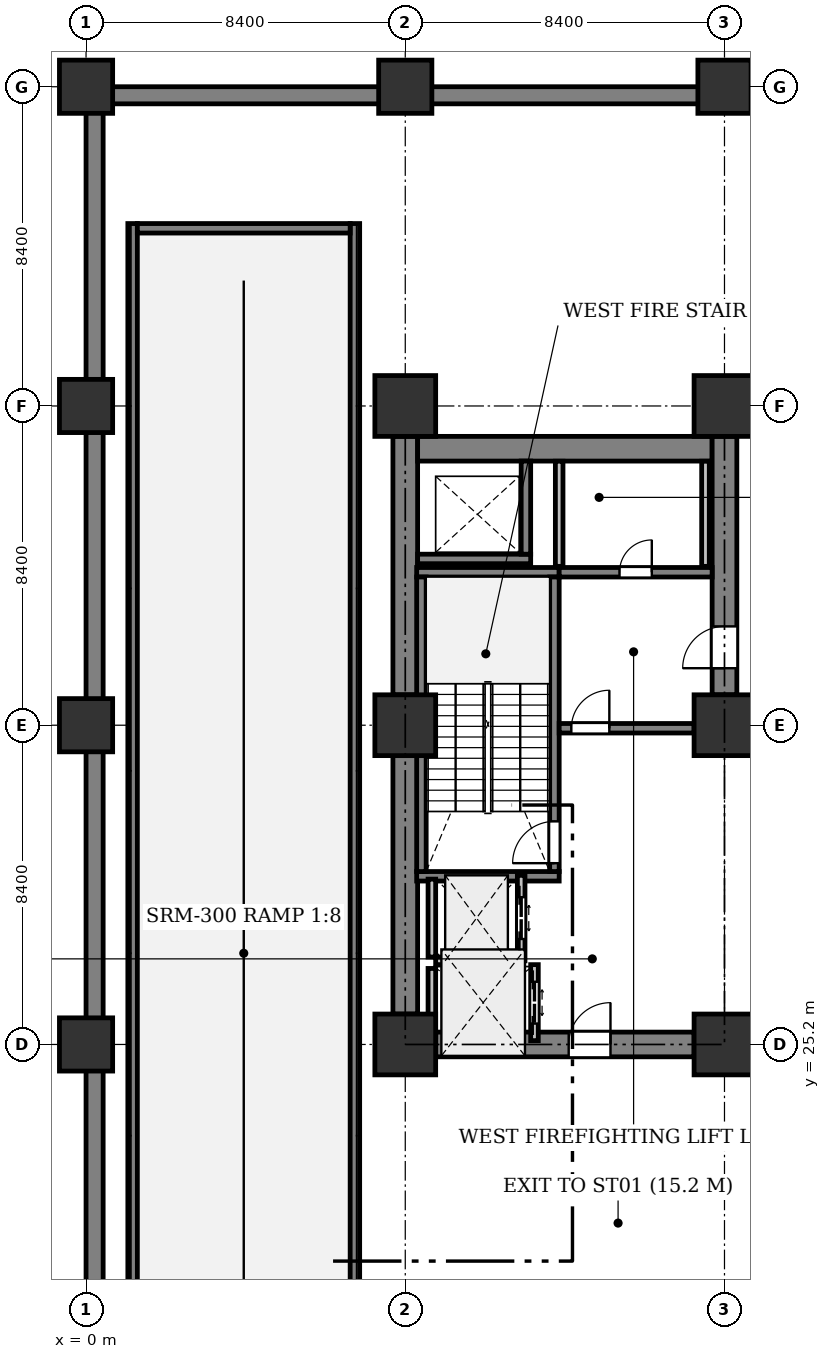
"""IFC4 building model, lengths in metres.
Left out: names, types, materials, properties, quantities, classifications, styles, units other than length and angle.
Written with IfcOpenShell. Run it as: python <this file> out.ifc"""

import sys

from ifc_helpers import new_model, si_unit, direction, frame, frame_2d, origin, origin_2d, place, context, subcontext, project, spatial, rectangle, extrude, element, fill, save


model = new_model("IFC4")
c1 = context("Model", 3, precision=1e-05, world=origin(), true_north=direction((0.0, 1.0)))
c2 = subcontext(c1, "Body", "Model", "MODEL_VIEW")
j1 = project(units=[si_unit("LENGTHUNIT", "METRE"), si_unit("PLANEANGLEUNIT", "RADIAN")], contexts=[c1])
p1 = place(None, origin())
s1 = spatial("IfcSite", under=j1, at=p1, CompositionType="ELEMENT")
p2 = place(p1, origin())
s2 = spatial("IfcBuilding", under=s1, at=p2, CompositionType="ELEMENT")
p3 = place(p2, frame((0.0, 0.0, -9.6)))
s3 = spatial("IfcBuildingStorey", under=s2, at=p3, CompositionType="ELEMENT", Elevation=-9.6)
p4 = place(p3, frame((0.0, 50.175, 0.0), z_axis=(0.0, 0.0, 1.0), x_axis=(1.0, 0.0, 0.0)))
e1 = element("IfcWall", 1, at=p4, inside=s3, PredefinedType="SOLIDWALL", context=c2, shape_type="SweptSolid", body=[
    extrude(rectangle(XDim=58.8, YDim=0.45, at=frame_2d((29.4, 0.0))), origin(), (0.0, 0.0, 1.0), 4.48),
])
p5 = place(p3, frame((0.225, 0.45, 0.0), z_axis=(0.0, 0.0, 1.0), x_axis=(0.0, 1.0, 0.0)))
e2 = element("IfcWall", 2, at=p5, inside=s3, PredefinedType="SOLIDWALL", context=c2, shape_type="SweptSolid", body=[
    extrude(rectangle(XDim=49.5, YDim=0.45, at=frame_2d((24.75, 0.0))), origin(), (0.0, 0.0, 1.0), 4.48),
])
for number, where, z_axis, x_axis in (
    (3, (1.225, 8.4, 0.0), (0.0, 0.0, 1.0), (0.0, 1.0, 0.0)),
    (4, (7.075, 8.4, 0.0), (0.0, 0.0, 1.0), (0.0, 1.0, 0.0)),
):
    element("IfcWall", number, at=place(p3, frame(where, z_axis=z_axis, x_axis=x_axis)), inside=s3, PredefinedType="SHEAR", context=c2, shape_type="SweptSolid", body=[
        extrude(rectangle(XDim=38.4, YDim=0.25, at=frame_2d((19.2, 0.0))), origin(), (0.0, 0.0, 1.0), 4.48),
    ])
p6 = place(p3, frame((1.35, 46.675, 0.0), z_axis=(0.0, 0.0, 1.0), x_axis=(1.0, 0.0, 0.0)))
e5 = element("IfcWall", 5, at=p6, inside=s3, PredefinedType="SHEAR", context=c2, shape_type="SweptSolid", body=[
    extrude(rectangle(XDim=5.6, YDim=0.25, at=frame_2d((2.8, 0.0))), origin(), (0.0, 0.0, 1.0), 4.48),
])
for number, where, z_axis, x_axis in (
    (6, (0.0, 25.2, 0.0), (0.0, 0.0, 1.0), (1.0, 0.0, 0.0)),
    (7, (0.0, 33.6, 0.0), (0.0, 0.0, 1.0), (1.0, 0.0, 0.0)),
    (8, (0.0, 42.0, 0.0), (0.0, 0.0, 1.0), (1.0, 0.0, 0.0)),
    (9, (0.0, 50.4, 0.0), (0.0, 0.0, 1.0), (1.0, 0.0, 0.0)),
):
    element("IfcColumn", number, at=place(p3, frame(where, z_axis=z_axis, x_axis=x_axis)), inside=s3, PredefinedType="COLUMN", context=c2, shape_type="SweptSolid", body=[
        extrude(rectangle(XDim=1.4, YDim=1.4, at=origin_2d()), origin(), (0.0, 0.0, 1.0), 4.8),
    ])
for number, where, z_axis, x_axis in (
    (10, (8.4, 25.2, 0.0), (0.0, 0.0, 1.0), (1.0, 0.0, 0.0)),
    (11, (8.4, 33.6, 0.0), (0.0, 0.0, 1.0), (1.0, 0.0, 0.0)),
    (12, (8.4, 42.0, 0.0), (0.0, 0.0, 1.0), (1.0, 0.0, 0.0)),
):
    element("IfcColumn", number, at=place(p3, frame(where, z_axis=z_axis, x_axis=x_axis)), inside=s3, PredefinedType="COLUMN", context=c2, shape_type="SweptSolid", body=[
        extrude(rectangle(XDim=1.6, YDim=1.6, at=origin_2d()), origin(), (0.0, 0.0, 1.0), 4.8),
    ])
p7 = place(p3, frame((8.4, 50.4, 0.0), z_axis=(0.0, 0.0, 1.0), x_axis=(1.0, 0.0, 0.0)))
e13 = element("IfcColumn", 13, at=p7, inside=s3, PredefinedType="COLUMN", context=c2, shape_type="SweptSolid", body=[
    extrude(rectangle(XDim=1.4, YDim=1.4, at=origin_2d()), origin(), (0.0, 0.0, 1.0), 4.8),
])
for number, where, z_axis, x_axis in (
    (14, (16.8, 25.2, 0.0), (0.0, 0.0, 1.0), (1.0, 0.0, 0.0)),
    (15, (16.8, 33.6, 0.0), (0.0, 0.0, 1.0), (1.0, 0.0, 0.0)),
    (16, (16.8, 42.0, 0.0), (0.0, 0.0, 1.0), (1.0, 0.0, 0.0)),
):
    element("IfcColumn", number, at=place(p3, frame(where, z_axis=z_axis, x_axis=x_axis)), inside=s3, PredefinedType="COLUMN", context=c2, shape_type="SweptSolid", body=[
        extrude(rectangle(XDim=1.6, YDim=1.6, at=origin_2d()), origin(), (0.0, 0.0, 1.0), 4.8),
    ])
p8 = place(p3, frame((16.8, 50.4, 0.0), z_axis=(0.0, 0.0, 1.0), x_axis=(1.0, 0.0, 0.0)))
e17 = element("IfcColumn", 17, at=p8, inside=s3, PredefinedType="COLUMN", context=c2, shape_type="SweptSolid", body=[
    extrude(rectangle(XDim=1.4, YDim=1.4, at=origin_2d()), origin(), (0.0, 0.0, 1.0), 4.8),
])
for number, where, z_axis, x_axis in (
    (18, (8.4, 26.0, 0.0), (0.0, 0.0, 1.0), (0.0, 1.0, 0.0)),
    (19, (8.4, 34.4, 0.0), (0.0, 0.0, 1.0), (0.0, 1.0, 0.0)),
):
    element("IfcWall", number, at=place(p3, frame(where, z_axis=z_axis, x_axis=x_axis)), inside=s3, PredefinedType="SHEAR", context=c2, shape_type="SweptSolid", body=[
        extrude(rectangle(XDim=6.8, YDim=0.65, at=frame_2d((3.4, 0.0))), origin(), (0.0, 0.0, 1.0), 4.48),
    ])
p9 = place(p3, frame((8.725, 40.875, 0.0), z_axis=(0.0, 0.0, 1.0), x_axis=(1.0, 0.0, 0.0)))
e20 = element("IfcWall", 20, at=p9, inside=s3, PredefinedType="SHEAR", context=c2, shape_type="SweptSolid", body=[
    extrude(rectangle(XDim=7.75, YDim=0.65, at=frame_2d((3.875, 0.0))), origin(), (0.0, 0.0, 1.0), 4.48),
])
p10 = place(p3, frame((16.8, 34.4, 0.0), z_axis=(0.0, 0.0, 1.0), x_axis=(0.0, 1.0, 0.0)))
e21 = element("IfcWall", 21, at=p10, inside=s3, PredefinedType="SHEAR", context=c2, shape_type="SweptSolid", body=[
    extrude(rectangle(XDim=6.8, YDim=0.65, at=frame_2d((3.4, 0.0))), origin(), (0.0, 0.0, 1.0), 4.48),
])
p11 = place(p10, frame((0.7, 0.0, 0.0)))
e22 = element("IfcOpeningElement", 22, at=p11, cuts=e21, PredefinedType="OPENING", context=c2, shape_type="SweptSolid", body=[
    extrude(rectangle(XDim=1.1, YDim=2.15, at=frame_2d((0.55, 1.075))), frame((0.0, 0.335, 0.0), z_axis=(0.0, -1.0, 0.0), x_axis=(1.0, 0.0, 0.0)), (0.0, 0.0, 1.0), 0.67),
])
p12 = place(p3, frame((9.2, 25.2, 0.0), z_axis=(0.0, 0.0, 1.0), x_axis=(1.0, 0.0, 0.0)))
e23 = element("IfcWall", 23, at=p12, inside=s3, PredefinedType="SHEAR", context=c2, shape_type="SweptSolid", body=[
    extrude(rectangle(XDim=6.8, YDim=0.65, at=frame_2d((3.4, 0.0))), origin(), (0.0, 0.0, 1.0), 4.48),
])
p13 = place(p12, frame((3.5, 0.0, 0.0)))
e24 = element("IfcOpeningElement", 24, at=p13, cuts=e23, PredefinedType="OPENING", context=c2, shape_type="SweptSolid", body=[
    extrude(rectangle(XDim=1.1, YDim=2.15, at=frame_2d((0.55, 1.075))), frame((0.0, 0.335, 0.0), z_axis=(0.0, -1.0, 0.0), x_axis=(1.0, 0.0, 0.0)), (0.0, 0.0, 1.0), 0.67),
])
for number, where, z_axis, x_axis in (
    (25, (12.45, 29.625, 0.0), (0.0, 0.0, 1.0), (-1.0, 0.0, 0.0)),
    (26, (12.45, 37.625, 0.0), (0.0, 0.0, 1.0), (-1.0, 0.0, 0.0)),
):
    element("IfcWall", number, at=place(p3, frame(where, z_axis=z_axis, x_axis=x_axis)), inside=s3, PredefinedType="SHEAR", context=c2, shape_type="SweptSolid", body=[
        extrude(rectangle(XDim=3.75, YDim=0.25, at=frame_2d((1.875, 0.0))), origin(), (0.0, 0.0, 1.0), 4.48),
    ])
p14 = place(p3, frame((12.325, 29.75, 0.0), z_axis=(0.0, 0.0, 1.0), x_axis=(0.0, 1.0, 0.0)))
e27 = element("IfcWall", 27, at=p14, inside=s3, PredefinedType="SHEAR", context=c2, shape_type="SweptSolid", body=[
    extrude(rectangle(XDim=7.75, YDim=0.25, at=frame_2d((3.875, 0.0))), origin(), (0.0, 0.0, 1.0), 4.48),
])
p15 = place(p14, frame((0.22, 0.0, 0.0)))
e28 = element("IfcOpeningElement", 28, at=p15, cuts=e27, PredefinedType="OPENING", context=c2, shape_type="SweptSolid", body=[
    extrude(rectangle(XDim=1.1, YDim=2.15, at=frame_2d((0.55, 1.075))), frame((0.0, 0.135, 0.0), z_axis=(0.0, -1.0, 0.0), x_axis=(1.0, 0.0, 0.0)), (0.0, 0.0, 1.0), 0.27),
])
p16 = place(p3, frame((8.825, 29.75, 0.0), z_axis=(0.0, 0.0, 1.0), x_axis=(0.0, 1.0, 0.0)))
e29 = element("IfcWall", 29, at=p16, inside=s3, PredefinedType="SHEAR", context=c2, shape_type="SweptSolid", body=[
    extrude(rectangle(XDim=7.75, YDim=0.25, at=frame_2d((3.875, 0.0))), origin(), (0.0, 0.0, 1.0), 4.48),
])
p17 = place(p3, frame((8.725, 37.975, 0.0), z_axis=(0.0, 0.0, 1.0), x_axis=(1.0, 0.0, 0.0)))
e30 = element("IfcWall", 30, at=p17, inside=s3, PredefinedType="SHEAR", context=c2, shape_type="SweptSolid", body=[
    extrude(rectangle(XDim=2.975, YDim=0.25, at=frame_2d((1.487, 0.0))), origin(), (0.0, 0.0, 1.0), 4.48),
])
p18 = place(p3, frame((11.575, 38.1, 0.0), z_axis=(0.0, 0.0, 1.0), x_axis=(0.0, 1.0, 0.0)))
e31 = element("IfcWall", 31, at=p18, inside=s3, PredefinedType="SHEAR", context=c2, shape_type="SweptSolid", body=[
    extrude(rectangle(XDim=2.45, YDim=0.25, at=frame_2d((1.225, 0.0))), origin(), (0.0, 0.0, 1.0), 4.48),
])
p19 = place(p3, frame((12.45, 33.52, 0.0), z_axis=(0.0, 0.0, 1.0), x_axis=(1.0, 0.0, 0.0)))
e32 = element("IfcWall", 32, at=p19, inside=s3, PredefinedType="SHEAR", context=c2, shape_type="SweptSolid", body=[
    extrude(rectangle(XDim=3.55, YDim=0.25, at=frame_2d((1.775, 0.0))), origin(), (0.0, 0.0, 1.0), 4.48),
])
p20 = place(p19, frame((0.32, 0.0, 0.0)))
e33 = element("IfcOpeningElement", 33, at=p20, cuts=e32, PredefinedType="OPENING", context=c2, shape_type="SweptSolid", body=[
    extrude(rectangle(XDim=1.0, YDim=2.15, at=frame_2d((0.5, 1.075))), frame((0.0, 0.135, 0.0), z_axis=(0.0, -1.0, 0.0), x_axis=(1.0, 0.0, 0.0)), (0.0, 0.0, 1.0), 0.27),
])
p21 = place(p3, frame((12.45, 37.625, 0.0), z_axis=(0.0, 0.0, 1.0), x_axis=(1.0, 0.0, 0.0)))
e34 = element("IfcWall", 34, at=p21, inside=s3, PredefinedType="SHEAR", context=c2, shape_type="SweptSolid", body=[
    extrude(rectangle(XDim=4.025, YDim=0.25, at=frame_2d((2.013, 0.0))), origin(), (0.0, 0.0, 1.0), 4.48),
])
p22 = place(p21, frame((1.587, 0.0, 0.0)))
e35 = element("IfcOpeningElement", 35, at=p22, cuts=e34, PredefinedType="OPENING", context=c2, shape_type="SweptSolid", body=[
    extrude(rectangle(XDim=0.85, YDim=2.15, at=frame_2d((0.425, 1.075))), frame((0.0, 0.135, 0.0), z_axis=(0.0, -1.0, 0.0), x_axis=(1.0, 0.0, 0.0)), (0.0, 0.0, 1.0), 0.27),
])
p23 = place(p3, frame((11.45, 27.4, 0.0), z_axis=(0.0, 0.0, 1.0), x_axis=(0.0, 1.0, 0.0)))
e36 = element("IfcWall", 36, at=p23, inside=s3, PredefinedType="PARTITIONING", context=c2, shape_type="SweptSolid", body=[
    extrude(rectangle(XDim=2.25, YDim=0.2, at=frame_2d((1.125, 0.0))), origin(), (0.0, 0.0, 1.0), 4.48),
])
p24 = place(p23, frame((0.575, 0.0, 0.0)))
e37 = element("IfcOpeningElement", 37, at=p24, cuts=e36, PredefinedType="OPENING", context=c2, shape_type="SweptSolid", body=[
    extrude(rectangle(XDim=1.1, YDim=2.2, at=frame_2d((0.55, 1.1))), frame((0.0, 0.11, 0.0), z_axis=(0.0, -1.0, 0.0), x_axis=(1.0, 0.0, 0.0)), (0.0, 0.0, 1.0), 0.22),
])
p25 = place(p3, frame((9.1, 27.5, 0.0), z_axis=(0.0, 0.0, 1.0), x_axis=(0.0, 1.0, 0.0)))
e38 = element("IfcWall", 38, at=p25, inside=s3, PredefinedType="PARTITIONING", context=c2, shape_type="SweptSolid", body=[
    extrude(rectangle(XDim=2.05, YDim=0.2, at=frame_2d((1.025, 0.0))), origin(), (0.0, 0.0, 1.0), 4.48),
])
p26 = place(p3, frame((9.2, 27.4, 0.0), z_axis=(0.0, 0.0, 1.0), x_axis=(1.0, 0.0, 0.0)))
e39 = element("IfcWall", 39, at=p26, inside=s3, PredefinedType="PARTITIONING", context=c2, shape_type="SweptSolid", body=[
    extrude(rectangle(XDim=2.15, YDim=0.2, at=frame_2d((1.075, 0.0))), origin(), (0.0, 0.0, 1.0), 4.48),
])
p27 = place(p3, frame((11.8, 25.3, 0.0), z_axis=(0.0, 0.0, 1.0), x_axis=(0.0, 1.0, 0.0)))
e40 = element("IfcWall", 40, at=p27, inside=s3, PredefinedType="PARTITIONING", context=c2, shape_type="SweptSolid", body=[
    extrude(rectangle(XDim=2.0, YDim=0.2, at=frame_2d((1.0, 0.0))), origin(), (0.0, 0.0, 1.0), 4.48),
])
p28 = place(p27, frame((0.45, 0.0, 0.0)))
e41 = element("IfcOpeningElement", 41, at=p28, cuts=e40, PredefinedType="OPENING", context=c2, shape_type="SweptSolid", body=[
    extrude(rectangle(XDim=1.1, YDim=2.2, at=frame_2d((0.55, 1.1))), frame((0.0, 0.11, 0.0), z_axis=(0.0, -1.0, 0.0), x_axis=(1.0, 0.0, 0.0)), (0.0, 0.0, 1.0), 0.22),
])
p29 = place(p3, frame((9.1, 25.4, 0.0), z_axis=(0.0, 0.0, 1.0), x_axis=(0.0, 1.0, 0.0)))
e42 = element("IfcWall", 42, at=p29, inside=s3, PredefinedType="PARTITIONING", context=c2, shape_type="SweptSolid", body=[
    extrude(rectangle(XDim=1.8, YDim=0.2, at=frame_2d((0.9, 0.0))), origin(), (0.0, 0.0, 1.0), 4.48),
])
for number, where, z_axis, x_axis in (
    (43, (16.3, 37.78, 0.0), (0.0, 0.0, 1.0), (0.0, 1.0, 0.0)),
    (44, (12.45, 40.546, 0.0), (0.0, 0.0, 1.0), (0.0, -1.0, 0.0)),
):
    element("IfcWall", number, at=place(p3, frame(where, z_axis=z_axis, x_axis=x_axis)), inside=s3, PredefinedType="PARTITIONING", context=c2, shape_type="SweptSolid", body=[
        extrude(rectangle(XDim=2.766, YDim=0.2, at=frame_2d((1.383, 0.0))), origin(), (0.0, 0.0, 1.0), 4.48),
    ])
p30 = place(p3, frame((8.3, 49.68, 0.0), z_axis=(0.0, 0.0, 1.0), x_axis=(-1.0, 0.0, 0.0)))
e45 = element("IfcWall", 45, at=p30, inside=s3, PredefinedType="PARTITIONING", context=c2, shape_type="SweptSolid", body=[
    extrude(rectangle(XDim=0.6, YDim=0.2, at=frame_2d((0.3, 0.0))), origin(), (0.0, 0.0, 1.0), 3.868),
])
p31 = place(p3, frame((0.72, 42.7, 0.0), z_axis=(0.0, 0.0, 1.0), x_axis=(0.0, -1.0, 0.0)))
e46 = element("IfcWall", 46, at=p31, inside=s3, PredefinedType="PARTITIONING", context=c2, shape_type="SweptSolid", body=[
    extrude(rectangle(XDim=1.4, YDim=0.2, at=frame_2d((0.7, 0.0))), origin(), (0.0, 0.0, 1.0), 4.48),
])
p32 = place(p3, frame((0.72, 34.3, 0.0), z_axis=(0.0, 0.0, 1.0), x_axis=(0.0, -1.0, 0.0)))
e47 = element("IfcWall", 47, at=p32, inside=s3, PredefinedType="PARTITIONING", context=c2, shape_type="SweptSolid", body=[
    extrude(rectangle(XDim=1.4, YDim=0.2, at=frame_2d((0.7, 0.0))), origin(), (0.0, 0.0, 1.0), 4.48),
])
p33 = place(p3, frame((0.72, 25.9, 0.0), z_axis=(0.0, 0.0, 1.0), x_axis=(0.0, -1.0, 0.0)))
e48 = element("IfcWall", 48, at=p33, inside=s3, PredefinedType="PARTITIONING", context=c2, shape_type="SweptSolid", body=[
    extrude(rectangle(XDim=1.4, YDim=0.2, at=frame_2d((0.7, 0.0))), origin(), (0.0, 0.0, 1.0), 4.48),
])
p34 = place(p3, frame((0.454, 20.0, 0.0), z_axis=(0.0, 0.0, 1.0), x_axis=(1.0, 0.0, 0.0)))
e49 = element("IfcWall", 49, at=p34, inside=s3, PredefinedType="PARTITIONING", context=c2, shape_type="SweptSolid", body=[
    extrude(rectangle(XDim=0.642, YDim=0.2, at=frame_2d((0.321, 0.0))), origin(), (0.0, 0.0, 1.0), 4.48),
])
p35 = place(p3, frame((1.354, 20.0, 0.0), z_axis=(0.0, 0.0, 1.0), x_axis=(1.0, 0.0, 0.0)))
e50 = element("IfcWall", 50, at=p35, inside=s3, PredefinedType="PARTITIONING", context=c2, shape_type="SweptSolid", body=[
    extrude(rectangle(XDim=3.986, YDim=0.2, at=frame_2d((1.993, 0.0))), origin(), (0.0, 0.0, 1.0), 4.48),
])
p36 = place(p3, frame((5.34, 20.0, 0.0), z_axis=(0.0, 0.0, 1.0), x_axis=(1.5253203e-05, 0.999999999884, 0.0)))
e51 = element("IfcWall", 51, at=p36, inside=s3, PredefinedType="PARTITIONING", context=c2, shape_type="SweptSolid", body=[
    extrude(rectangle(XDim=16.006, YDim=0.2, at=frame_2d((8.003, 0.0))), origin(), (0.0, 0.0, 1.0), 4.48),
])
p37 = place(p36, frame((7.503, 0.0, 0.0)))
e52 = element("IfcOpeningElement", 52, at=p37, cuts=e51, PredefinedType="OPENING", context=c2, shape_type="SweptSolid", body=[
    extrude(rectangle(XDim=1.0, YDim=2.15, at=frame_2d((0.5, 1.075))), frame((0.0, 0.11, 0.0), z_axis=(0.0, -1.0, 0.0), x_axis=(1.0, 0.0, 0.0)), (0.0, 0.0, 1.0), 0.22),
])
p38 = place(p3, frame((5.4, 36.06, 0.0), z_axis=(0.0, 0.0, 1.0), x_axis=(1.0, 0.0, 0.0)))
e53 = element("IfcWall", 53, at=p38, inside=s3, PredefinedType="PARTITIONING", context=c2, shape_type="SweptSolid", body=[
    extrude(rectangle(XDim=1.546, YDim=0.2, at=frame_2d((0.773, 0.0))), origin(), (0.0, 0.0, 1.0), 4.48),
])
p39 = place(p3, frame((7.71, 36.0, 0.0), z_axis=(0.0, 0.0, 1.0), x_axis=(0.0, -1.0, 0.0)))
e54 = element("IfcWall", 54, at=p39, inside=s3, PredefinedType="PARTITIONING", context=c2, shape_type="SweptSolid", body=[
    extrude(rectangle(XDim=1.58, YDim=0.2, at=frame_2d((0.79, 0.0))), origin(), (0.0, 0.0, 1.0), 4.48),
])
p40 = place(p3, frame((7.581, 41.194, 0.0), z_axis=(0.0, 0.0, 1.0), x_axis=(-0.000456065626, 0.999999896002, 0.0)))
e55 = element("IfcWall", 55, at=p40, inside=s3, PredefinedType="PARTITIONING", context=c2, shape_type="SweptSolid", body=[
    extrude(rectangle(XDim=1.606, YDim=0.2, at=frame_2d((0.803, 0.0))), origin(), (0.0, 0.0, 1.0), 4.48),
])
p41 = place(p3, frame((7.6, 42.82, 0.0), z_axis=(0.0, 0.0, 1.0), x_axis=(1.0, 0.0, 0.0)))
e56 = element("IfcWall", 56, at=p41, inside=s3, PredefinedType="PARTITIONING", context=c2, shape_type="SweptSolid", body=[
    extrude(rectangle(XDim=0.7, YDim=0.2, at=frame_2d((0.35, 0.0))), origin(), (0.0, 0.0, 1.0), 3.868),
])
p42 = place(p3, frame((8.3, 42.924, 0.0), z_axis=(0.0, 0.0, 1.0), x_axis=(0.0, 1.0, 0.0)))
e57 = element("IfcWall", 57, at=p42, inside=s3, PredefinedType="PARTITIONING", context=c2, shape_type="SweptSolid", body=[
    extrude(rectangle(XDim=6.652, YDim=0.2, at=frame_2d((3.326, 0.0))), origin(), (0.0, 0.0, 1.0), 3.868),
])
p43 = place(p11, origin())
e58 = element("IfcDoor", 58, at=p43, inside=s3, OperationType="SINGLE_SWING_LEFT", PredefinedType="DOOR", context=c2, shape_type="SweptSolid", body=[
    extrude(rectangle(XDim=1.1, YDim=2.15, at=frame_2d((0.55, 1.075))), frame((0.0, 0.025, 0.0), z_axis=(0.0, -1.0, 0.0), x_axis=(1.0, 0.0, 0.0)), (0.0, 0.0, 1.0), 0.05),
])
fill(e22, e58)
p44 = place(p13, origin())
e59 = element("IfcDoor", 59, at=p44, inside=s3, OperationType="SINGLE_SWING_RIGHT", PredefinedType="DOOR", context=c2, shape_type="SweptSolid", body=[
    extrude(rectangle(XDim=1.1, YDim=2.15, at=frame_2d((0.55, 1.075))), frame((0.0, 0.025, 0.0), z_axis=(0.0, -1.0, 0.0), x_axis=(1.0, 0.0, 0.0)), (0.0, 0.0, 1.0), 0.05),
])
fill(e24, e59)
p45 = place(p15, origin())
e60 = element("IfcDoor", 60, at=p45, inside=s3, OperationType="SINGLE_SWING_LEFT", PredefinedType="DOOR", context=c2, shape_type="SweptSolid", body=[
    extrude(rectangle(XDim=1.1, YDim=2.15, at=frame_2d((0.55, 1.075))), frame((0.0, 0.025, 0.0), z_axis=(0.0, -1.0, 0.0), x_axis=(1.0, 0.0, 0.0)), (0.0, 0.0, 1.0), 0.05),
])
fill(e28, e60)
p46 = place(p20, origin())
e61 = element("IfcDoor", 61, at=p46, inside=s3, OperationType="SINGLE_SWING_RIGHT", PredefinedType="DOOR", context=c2, shape_type="SweptSolid", body=[
    extrude(rectangle(XDim=1.0, YDim=2.15, at=frame_2d((0.5, 1.075))), frame((0.0, 0.025, 0.0), z_axis=(0.0, -1.0, 0.0), x_axis=(1.0, 0.0, 0.0)), (0.0, 0.0, 1.0), 0.05),
])
fill(e33, e61)
p47 = place(p24, origin())
e62 = element("IfcDoor", 62, at=p47, inside=s3, OperationType="DOUBLE_DOOR_SLIDING", PredefinedType="DOOR", context=c2, shape_type="SweptSolid", body=[
    extrude(rectangle(XDim=1.1, YDim=2.2, at=frame_2d((0.55, 1.1))), frame((0.0, 0.025, 0.0), z_axis=(0.0, -1.0, 0.0), x_axis=(1.0, 0.0, 0.0)), (0.0, 0.0, 1.0), 0.05),
])
fill(e37, e62)
p48 = place(p28, origin())
e63 = element("IfcDoor", 63, at=p48, inside=s3, OperationType="DOUBLE_DOOR_SLIDING", PredefinedType="DOOR", context=c2, shape_type="SweptSolid", body=[
    extrude(rectangle(XDim=1.1, YDim=2.2, at=frame_2d((0.55, 1.1))), frame((0.0, 0.025, 0.0), z_axis=(0.0, -1.0, 0.0), x_axis=(1.0, 0.0, 0.0)), (0.0, 0.0, 1.0), 0.05),
])
fill(e41, e63)
p49 = place(p22, origin())
e64 = element("IfcDoor", 64, at=p49, inside=s3, OperationType="SINGLE_SWING_RIGHT", PredefinedType="DOOR", context=c2, shape_type="SweptSolid", body=[
    extrude(rectangle(XDim=0.85, YDim=2.15, at=frame_2d((0.425, 1.075))), frame((0.0, 0.025, 0.0), z_axis=(0.0, -1.0, 0.0), x_axis=(1.0, 0.0, 0.0)), (0.0, 0.0, 1.0), 0.05),
])
fill(e35, e64)
p50 = place(p37, origin())
e65 = element("IfcDoor", 65, at=p50, inside=s3, OperationType="SINGLE_SWING_LEFT", PredefinedType="DOOR", context=c2, shape_type="SweptSolid", body=[
    extrude(rectangle(XDim=1.0, YDim=2.15, at=frame_2d((0.5, 1.075))), frame((0.0, 0.025, 0.0), z_axis=(0.0, -1.0, 0.0), x_axis=(1.0, 0.0, 0.0)), (0.0, 0.0, 1.0), 0.05),
])
fill(e52, e65)
save(model, sys.argv[1])
